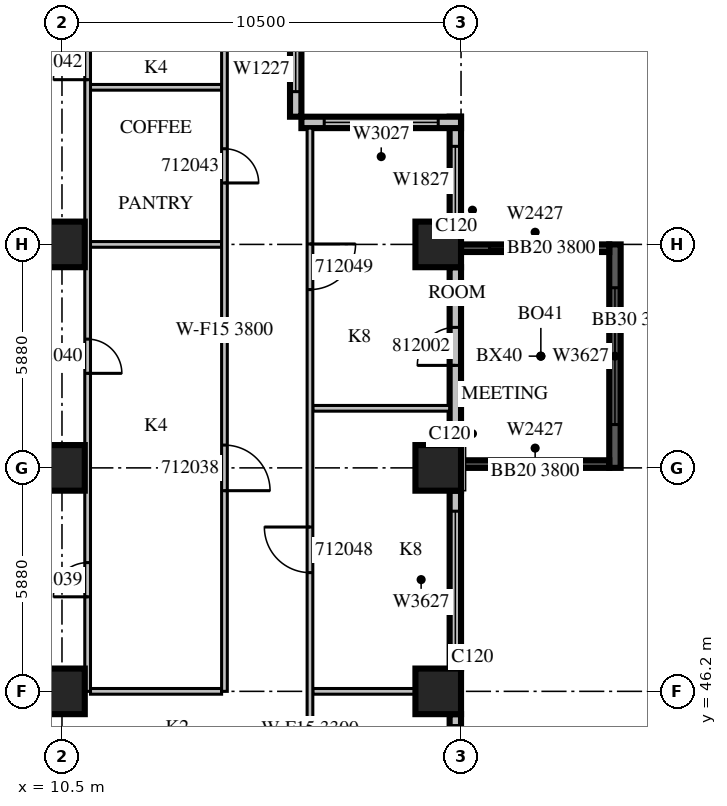
"""IFC4 building model, lengths in metres.
Left out: names, types, materials, properties, quantities, classifications, styles, units other than length and angle.
Written with IfcOpenShell. Run it as: python <this file> out.ifc"""

import sys

from ifc_helpers import new_model, si_unit, direction, frame, frame_2d, origin, origin_2d, place, context, subcontext, project, spatial, rectangle, extrude, source, transform, mapped, element, fill, save


model = new_model("IFC4")
c1 = context("Model", 3, precision=1e-05, world=origin(), true_north=direction((0.0, 1.0)))
c2 = subcontext(c1, "Body", "Model", "MODEL_VIEW")
j1 = project(units=[si_unit("LENGTHUNIT", "METRE"), si_unit("PLANEANGLEUNIT", "RADIAN")], contexts=[c1])
p1 = place(None, origin())
s1 = spatial("IfcSite", under=j1, at=p1, CompositionType="ELEMENT")
p2 = place(p1, origin())
s2 = spatial("IfcBuilding", under=s1, at=p2, CompositionType="ELEMENT")
p3 = place(p2, frame((0.0, 0.0, 61.5)))
s3 = spatial("IfcBuildingStorey", under=s2, at=p3, CompositionType="ELEMENT", Elevation=61.5)
m1 = source(origin(), c2, "Body", "SweptSolid", [
    extrude(rectangle(XDim=1.2, YDim=1.2, at=origin_2d()), origin(), (0.0, 0.0, 1.0), 4.2),
])
for number, where, z_axis, x_axis in (
    (1, (10.5, 46.2, 0.0), (0.0, 0.0, 1.0), (1.0, 0.0, 0.0)),
    (2, (20.4, 46.2, 0.0), (0.0, 0.0, 1.0), (1.0, 0.0, 0.0)),
    (3, (10.5, 52.08, 0.0), (0.0, 0.0, 1.0), (1.0, 0.0, 0.0)),
    (4, (20.4, 52.08, 0.0), (0.0, 0.0, 1.0), (1.0, 0.0, 0.0)),
    (5, (10.5, 57.96, 0.0), (0.0, 0.0, 1.0), (1.0, 0.0, 0.0)),
    (6, (20.4, 57.96, 0.0), (0.0, 0.0, 1.0), (1.0, 0.0, 0.0)),
):
    element("IfcColumn", number, at=place(p3, frame(where, z_axis=z_axis, x_axis=x_axis)), inside=s3, PredefinedType="COLUMN", context=c2, shape_type="MappedRepresentation", body=[
        mapped(m1, transform((0.0, 0.0, 0.0), scale=1.0)),
    ])
m2 = source(origin(), c2, "Body", "SweptSolid", [
    extrude(rectangle(XDim=5.88, YDim=0.3, at=frame_2d((2.94, 0.0))), origin(), (0.0, 0.0, 1.0), 3.8),
])
p4 = place(p3, frame((25.05, 52.08, 0.0), z_axis=(0.0, 0.0, 1.0), x_axis=(0.0, 1.0, 0.0)))
e7 = element("IfcWall", 7, at=p4, inside=s3, PredefinedType="SOLIDWALL", context=c2, shape_type="MappedRepresentation", body=[
    mapped(m2, transform((0.0, 0.0, 0.0), scale=1.0)),
])
m3 = source(origin(), c2, "Body", "SweptSolid", [
    extrude(rectangle(XDim=3.6, YDim=2.7, at=frame_2d((1.8, 1.35))), frame((0.0, 0.16, 0.0), z_axis=(0.0, -1.0, 0.0), x_axis=(1.0, 0.0, 0.0)), (0.0, 0.0, 1.0), 0.32),
])
p5 = place(p4, frame((1.14, 0.0, 0.6)))
e8 = element("IfcOpeningElement", 8, at=p5, cuts=e7, PredefinedType="OPENING", context=c2, shape_type="MappedRepresentation", body=[
    mapped(m3, transform((0.0, 0.0, 0.0), scale=1.0)),
])
m4 = source(origin(), c2, "Body", "SweptSolid", [
    extrude(rectangle(XDim=3.9, YDim=0.2, at=frame_2d((1.95, 0.0))), origin(), (0.0, 0.0, 1.0), 3.8),
])
p6 = place(p3, frame((21.0, 52.18, 0.0), z_axis=(0.0, 0.0, 1.0), x_axis=(1.0, 0.0, 0.0)))
e9 = element("IfcWall", 9, at=p6, inside=s3, PredefinedType="SOLIDWALL", context=c2, shape_type="MappedRepresentation", body=[
    mapped(m4, transform((0.0, 0.0, 0.0), scale=1.0)),
])
m5 = source(origin(), c2, "Body", "SweptSolid", [
    extrude(rectangle(XDim=2.4, YDim=2.7, at=frame_2d((1.2, 1.35))), frame((0.0, 0.11, 0.0), z_axis=(0.0, -1.0, 0.0), x_axis=(1.0, 0.0, 0.0)), (0.0, 0.0, 1.0), 0.22),
])
p7 = place(p6, frame((0.75, 0.0, 0.6)))
e10 = element("IfcOpeningElement", 10, at=p7, cuts=e9, PredefinedType="OPENING", context=c2, shape_type="MappedRepresentation", body=[
    mapped(m5, transform((0.0, 0.0, 0.0), scale=1.0)),
])
p8 = place(p3, frame((21.0, 57.86, 0.0), z_axis=(0.0, 0.0, 1.0), x_axis=(1.0, 0.0, 0.0)))
e11 = element("IfcWall", 11, at=p8, inside=s3, PredefinedType="SOLIDWALL", context=c2, shape_type="MappedRepresentation", body=[
    mapped(m4, transform((0.0, 0.0, 0.0), scale=1.0)),
])
p9 = place(p8, frame((0.75, 0.0, 0.6)))
e12 = element("IfcOpeningElement", 12, at=p9, cuts=e11, PredefinedType="OPENING", context=c2, shape_type="MappedRepresentation", body=[
    mapped(m5, transform((0.0, 0.0, 0.0), scale=1.0)),
])
m6 = source(origin(), c2, "Body", "SweptSolid", [
    extrude(rectangle(XDim=7.2, YDim=0.3, at=frame_2d((3.6, 0.0))), origin(), (0.0, 0.0, 1.0), 3.8),
])
p10 = place(p3, frame((20.85, 38.4, 0.0), z_axis=(0.0, 0.0, 1.0), x_axis=(0.0, 1.0, 0.0)))
e13 = element("IfcWall", 13, at=p10, inside=s3, PredefinedType="STANDARD", context=c2, shape_type="MappedRepresentation", body=[
    mapped(m6, transform((0.0, 0.0, 0.0), scale=1.0)),
])
m7 = source(origin(), c2, "Body", "SweptSolid", [
    extrude(rectangle(XDim=2.4, YDim=2.7, at=frame_2d((1.2, 1.35))), frame((0.0, 0.16, 0.0), z_axis=(0.0, -1.0, 0.0), x_axis=(1.0, 0.0, 0.0)), (0.0, 0.0, 1.0), 0.32),
])
p11 = place(p10, frame((0.3, 0.0, 0.6)))
e14 = element("IfcOpeningElement", 14, at=p11, cuts=e13, PredefinedType="OPENING", context=c2, shape_type="MappedRepresentation", body=[
    mapped(m7, transform((0.0, 0.0, 0.0), scale=1.0)),
])
p12 = place(p10, frame((4.5, 0.0, 0.6)))
e15 = element("IfcOpeningElement", 15, at=p12, cuts=e13, PredefinedType="OPENING", context=c2, shape_type="MappedRepresentation", body=[
    mapped(m7, transform((0.0, 0.0, 0.0), scale=1.0)),
])
m8 = source(origin(), c2, "Body", "SweptSolid", [
    extrude(rectangle(XDim=4.68, YDim=0.3, at=frame_2d((2.34, 0.0))), origin(), (0.0, 0.0, 1.0), 3.8),
])
p13 = place(p3, frame((20.85, 46.8, 0.0), z_axis=(0.0, 0.0, 1.0), x_axis=(0.0, 1.0, 0.0)))
e16 = element("IfcWall", 16, at=p13, inside=s3, PredefinedType="STANDARD", context=c2, shape_type="MappedRepresentation", body=[
    mapped(m8, transform((0.0, 0.0, 0.0), scale=1.0)),
])
p14 = place(p13, frame((0.54, 0.0, 0.6)))
e17 = element("IfcOpeningElement", 17, at=p14, cuts=e16, PredefinedType="OPENING", context=c2, shape_type="MappedRepresentation", body=[
    mapped(m3, transform((0.0, 0.0, 0.0), scale=1.0)),
])
p15 = place(p3, frame((20.85, 52.68, 0.0), z_axis=(0.0, 0.0, 1.0), x_axis=(0.0, 1.0, 0.0)))
e18 = element("IfcWall", 18, at=p15, inside=s3, PredefinedType="STANDARD", context=c2, shape_type="MappedRepresentation", body=[
    mapped(m8, transform((0.0, 0.0, 0.0), scale=1.0)),
])
m9 = source(origin(), c2, "Body", "SweptSolid", [
    extrude(rectangle(XDim=1.0, YDim=2.1, at=frame_2d((0.5, 1.05))), frame((0.0, 0.16, 0.0), z_axis=(0.0, -1.0, 0.0), x_axis=(1.0, 0.0, 0.0)), (0.0, 0.0, 1.0), 0.32),
])
p16 = place(p15, frame((2.097, 0.0, 0.0)))
e19 = element("IfcOpeningElement", 19, at=p16, cuts=e18, PredefinedType="OPENING", context=c2, shape_type="MappedRepresentation", body=[
    mapped(m9, transform((0.0, 0.0, 0.0), scale=1.0)),
])
m10 = source(origin(), c2, "Body", "SweptSolid", [
    extrude(rectangle(XDim=2.76, YDim=0.3, at=frame_2d((1.38, 0.0))), origin(), (0.0, 0.0, 1.0), 3.8),
])
p17 = place(p3, frame((20.85, 58.56, 0.0), z_axis=(0.0, 0.0, 1.0), x_axis=(0.0, 1.0, 0.0)))
e20 = element("IfcWall", 20, at=p17, inside=s3, PredefinedType="STANDARD", context=c2, shape_type="MappedRepresentation", body=[
    mapped(m10, transform((0.0, 0.0, 0.0), scale=1.0)),
])
m11 = source(origin(), c2, "Body", "SweptSolid", [
    extrude(rectangle(XDim=1.8, YDim=2.7, at=frame_2d((0.9, 1.35))), frame((0.0, 0.16, 0.0), z_axis=(0.0, -1.0, 0.0), x_axis=(1.0, 0.0, 0.0)), (0.0, 0.0, 1.0), 0.32),
])
p18 = place(p17, frame((0.18, 0.0, 0.6)))
e21 = element("IfcOpeningElement", 21, at=p18, cuts=e20, PredefinedType="OPENING", context=c2, shape_type="MappedRepresentation", body=[
    mapped(m11, transform((0.0, 0.0, 0.0), scale=1.0)),
])
m12 = source(origin(), c2, "Body", "SweptSolid", [
    extrude(rectangle(XDim=4.2, YDim=0.3, at=frame_2d((2.1, 0.0))), origin(), (0.0, 0.0, 1.0), 3.8),
])
p19 = place(p3, frame((21.0, 61.17, 0.0), z_axis=(0.0, 0.0, 1.0), x_axis=(-1.0, 0.0, 0.0)))
e22 = element("IfcWall", 22, at=p19, inside=s3, PredefinedType="STANDARD", context=c2, shape_type="MappedRepresentation", body=[
    mapped(m12, transform((0.0, 0.0, 0.0), scale=1.0)),
])
m13 = source(origin(), c2, "Body", "SweptSolid", [
    extrude(rectangle(XDim=3.0, YDim=2.7, at=frame_2d((1.5, 1.35))), frame((0.0, 0.16, 0.0), z_axis=(0.0, -1.0, 0.0), x_axis=(1.0, 0.0, 0.0)), (0.0, 0.0, 1.0), 0.32),
])
p20 = place(p19, frame((0.6, 0.0, 0.6)))
e23 = element("IfcOpeningElement", 23, at=p20, cuts=e22, PredefinedType="OPENING", context=c2, shape_type="MappedRepresentation", body=[
    mapped(m13, transform((0.0, 0.0, 0.0), scale=1.0)),
])
m14 = source(origin(), c2, "Body", "SweptSolid", [
    extrude(rectangle(XDim=2.52, YDim=0.3, at=frame_2d((1.26, 0.0))), origin(), (0.0, 0.0, 1.0), 3.8),
])
p21 = place(p3, frame((16.65, 61.32, 0.0), z_axis=(0.0, 0.0, 1.0), x_axis=(0.0, 1.0, 0.0)))
e24 = element("IfcWall", 24, at=p21, inside=s3, PredefinedType="STANDARD", context=c2, shape_type="MappedRepresentation", body=[
    mapped(m14, transform((0.0, 0.0, 0.0), scale=1.0)),
])
m15 = source(origin(), c2, "Body", "SweptSolid", [
    extrude(rectangle(XDim=1.2, YDim=2.7, at=frame_2d((0.6, 1.35))), frame((0.0, 0.16, 0.0), z_axis=(0.0, -1.0, 0.0), x_axis=(1.0, 0.0, 0.0)), (0.0, 0.0, 1.0), 0.32),
])
p22 = place(p21, frame((0.66, 0.0, 0.6)))
e25 = element("IfcOpeningElement", 25, at=p22, cuts=e24, PredefinedType="OPENING", context=c2, shape_type="MappedRepresentation", body=[
    mapped(m15, transform((0.0, 0.0, 0.0), scale=1.0)),
])
m16 = source(origin(), c2, "Body", "SweptSolid", [
    extrude(rectangle(XDim=3.45, YDim=0.15, at=frame_2d((1.725, 0.0))), origin(), (0.0, 0.0, 1.0), 3.8),
])
for number, where, z_axis, x_axis in (
    (26, (14.7, 62.093, 0.0), (0.0, 0.0, 1.0), (-1.0, 0.0, 0.0)),
    (27, (14.7, 46.2, 0.0), (0.0, 0.0, 1.0), (-1.0, 0.0, 0.0)),
    (28, (14.7, 57.96, 0.0), (0.0, 0.0, 1.0), (-1.0, 0.0, 0.0)),
):
    element("IfcWall", number, at=place(p3, frame(where, z_axis=z_axis, x_axis=x_axis)), inside=s3, PredefinedType="PARTITIONING", context=c2, shape_type="MappedRepresentation", body=[
        mapped(m16, transform((0.0, 0.0, 0.0), scale=1.0)),
    ])
m17 = source(origin(), c2, "Body", "SweptSolid", [
    extrude(rectangle(XDim=19.02, YDim=0.15, at=frame_2d((9.51, 0.0))), origin(), (0.0, 0.0, 1.0), 3.8),
])
p23 = place(p3, frame((11.175, 46.2, 0.0), z_axis=(0.0, 0.0, 1.0), x_axis=(0.0, 1.0, 0.0)))
e29 = element("IfcWall", 29, at=p23, inside=s3, PredefinedType="PARTITIONING", context=c2, shape_type="MappedRepresentation", body=[
    mapped(m17, transform((0.0, 0.0, 0.0), scale=1.0)),
])
m18 = source(origin(), c2, "Body", "SweptSolid", [
    extrude(rectangle(XDim=0.9, YDim=2.1, at=frame_2d((0.45, 1.05))), frame((0.0, 0.085, 0.0), z_axis=(0.0, -1.0, 0.0), x_axis=(1.0, 0.0, 0.0)), (0.0, 0.0, 1.0), 0.17),
])
p24 = place(p23, frame((2.487, 0.0, 0.0)))
e30 = element("IfcOpeningElement", 30, at=p24, cuts=e29, PredefinedType="OPENING", context=c2, shape_type="MappedRepresentation", body=[
    mapped(m18, transform((0.0, 0.0, 0.0), scale=1.0)),
])
p25 = place(p23, frame((8.367, 0.0, 0.0)))
e31 = element("IfcOpeningElement", 31, at=p25, cuts=e29, PredefinedType="OPENING", context=c2, shape_type="MappedRepresentation", body=[
    mapped(m18, transform((0.0, 0.0, 0.0), scale=1.0)),
])
p26 = place(p23, frame((16.094, 0.0, 0.0)))
e32 = element("IfcOpeningElement", 32, at=p26, cuts=e29, PredefinedType="OPENING", context=c2, shape_type="MappedRepresentation", body=[
    mapped(m18, transform((0.0, 0.0, 0.0), scale=1.0)),
])
m19 = source(origin(), c2, "Body", "SweptSolid", [
    extrude(rectangle(XDim=3.6, YDim=0.15, at=frame_2d((1.8, 0.0))), origin(), (0.0, 0.0, 1.0), 3.8),
])
p27 = place(p3, frame((17.1, 53.648, 0.0), z_axis=(0.0, 0.0, 1.0), x_axis=(1.0, 0.0, 0.0)))
e33 = element("IfcWall", 33, at=p27, inside=s3, PredefinedType="PARTITIONING", context=c2, shape_type="MappedRepresentation", body=[
    mapped(m19, transform((0.0, 0.0, 0.0), scale=1.0)),
])
m20 = source(origin(), c2, "Body", "SweptSolid", [
    extrude(rectangle(XDim=2.701, YDim=0.15, at=frame_2d((1.351, 0.0))), origin(), (0.0, 0.0, 1.0), 3.8),
])
p28 = place(p3, frame((19.801, 46.2, 0.0), z_axis=(0.0, 0.0, 1.0), x_axis=(-1.0, 0.0, 0.0)))
e34 = element("IfcWall", 34, at=p28, inside=s3, PredefinedType="PARTITIONING", context=c2, shape_type="MappedRepresentation", body=[
    mapped(m20, transform((0.0, 0.0, 0.0), scale=1.0)),
])
p29 = place(p3, frame((14.775, 46.2, 0.0), z_axis=(0.0, 0.0, 1.0), x_axis=(0.0, 1.0, 0.0)))
e35 = element("IfcWall", 35, at=p29, inside=s3, PredefinedType="PARTITIONING", context=c2, shape_type="MappedRepresentation", body=[
    mapped(m17, transform((0.0, 0.0, 0.0), scale=1.0)),
])
m21 = source(origin(), c2, "Body", "SweptSolid", [
    extrude(rectangle(XDim=1.2, YDim=2.1, at=frame_2d((0.6, 1.05))), frame((0.0, 0.085, 0.0), z_axis=(0.0, -1.0, 0.0), x_axis=(1.0, 0.0, 0.0)), (0.0, 0.0, 1.0), 0.17),
])
p30 = place(p29, frame((5.28, 0.0, 0.0)))
e36 = element("IfcOpeningElement", 36, at=p30, cuts=e35, PredefinedType="OPENING", context=c2, shape_type="MappedRepresentation", body=[
    mapped(m21, transform((0.0, 0.0, 0.0), scale=1.0)),
])
m22 = source(origin(), c2, "Body", "SweptSolid", [
    extrude(rectangle(XDim=1.1, YDim=2.1, at=frame_2d((0.55, 1.05))), frame((0.0, 0.085, 0.0), z_axis=(0.0, -1.0, 0.0), x_axis=(1.0, 0.0, 0.0)), (0.0, 0.0, 1.0), 0.17),
])
p31 = place(p29, frame((16.944, 0.0, 0.0)))
e37 = element("IfcOpeningElement", 37, at=p31, cuts=e35, PredefinedType="OPENING", context=c2, shape_type="MappedRepresentation", body=[
    mapped(m22, transform((0.0, 0.0, 0.0), scale=1.0)),
])
p32 = place(p29, frame((13.377, 0.0, 0.0)))
e38 = element("IfcOpeningElement", 38, at=p32, cuts=e35, PredefinedType="OPENING", context=c2, shape_type="MappedRepresentation", body=[
    mapped(m18, transform((0.0, 0.0, 0.0), scale=1.0)),
])
m23 = source(origin(), c2, "Body", "SweptSolid", [
    extrude(rectangle(XDim=31.62, YDim=0.15, at=frame_2d((15.81, 0.0))), origin(), (0.0, 0.0, 1.0), 3.3),
])
p33 = place(p3, frame((17.025, 61.02, 0.0), z_axis=(0.0, 0.0, 1.0), x_axis=(0.0, -1.0, 0.0)))
e39 = element("IfcWall", 39, at=p33, inside=s3, PredefinedType="PARTITIONING", context=c2, shape_type="MappedRepresentation", body=[
    mapped(m23, transform((0.0, 0.0, 0.0), scale=1.0)),
])
m24 = source(origin(), c2, "Body", "SweptSolid", [
    extrude(rectangle(XDim=1.0, YDim=2.1, at=frame_2d((0.5, 1.05))), frame((0.0, 0.085, 0.0), z_axis=(0.0, -1.0, 0.0), x_axis=(1.0, 0.0, 0.0)), (0.0, 0.0, 1.0), 0.17),
])
p34 = place(p33, frame((29.263, 0.0, 0.0)))
e40 = element("IfcOpeningElement", 40, at=p34, cuts=e39, PredefinedType="OPENING", context=c2, shape_type="MappedRepresentation", body=[
    mapped(m24, transform((0.0, 0.0, 0.0), scale=1.0)),
])
p35 = place(p33, frame((25.951, 0.0, 0.0)))
e41 = element("IfcOpeningElement", 41, at=p35, cuts=e39, PredefinedType="OPENING", context=c2, shape_type="MappedRepresentation", body=[
    mapped(m24, transform((0.0, 0.0, 0.0), scale=1.0)),
])
p36 = place(p33, frame((23.608, 0.0, 0.0)))
e42 = element("IfcOpeningElement", 42, at=p36, cuts=e39, PredefinedType="OPENING", context=c2, shape_type="MappedRepresentation", body=[
    mapped(m24, transform((0.0, 0.0, 0.0), scale=1.0)),
])
p37 = place(p33, frame((18.52, 0.0, 0.0)))
e43 = element("IfcOpeningElement", 43, at=p37, cuts=e39, PredefinedType="OPENING", context=c2, shape_type="MappedRepresentation", body=[
    mapped(m24, transform((0.0, 0.0, 0.0), scale=1.0)),
])
p38 = place(p33, frame((10.496, 0.0, 0.0)))
e44 = element("IfcOpeningElement", 44, at=p38, cuts=e39, PredefinedType="OPENING", context=c2, shape_type="MappedRepresentation", body=[
    mapped(m21, transform((0.0, 0.0, 0.0), scale=1.0)),
])
p39 = place(p33, frame((3.049, 0.0, 0.0)))
e45 = element("IfcOpeningElement", 45, at=p39, cuts=e39, PredefinedType="OPENING", context=c2, shape_type="MappedRepresentation", body=[
    mapped(m21, transform((0.0, 0.0, 0.0), scale=1.0)),
])
m25 = source(origin(), c2, "Body", "SweptSolid", [
    extrude(rectangle(XDim=3.6, YDim=2.7, at=frame_2d((1.8, 1.35))), frame((0.0, 0.03, 0.0), z_axis=(0.0, -1.0, 0.0), x_axis=(1.0, 0.0, 0.0)), (0.0, 0.0, 1.0), 0.06),
])
p40 = place(p5, origin())
e46 = element("IfcWindow", 46, at=p40, inside=s3, PartitioningType="SINGLE_PANEL", PredefinedType="WINDOW", context=c2, shape_type="MappedRepresentation", body=[
    mapped(m25, transform((0.0, 0.0, 0.0), scale=1.0)),
])
fill(e8, e46)
m26 = source(origin(), c2, "Body", "SweptSolid", [
    extrude(rectangle(XDim=2.4, YDim=2.7, at=frame_2d((1.2, 1.35))), frame((0.0, 0.03, 0.0), z_axis=(0.0, -1.0, 0.0), x_axis=(1.0, 0.0, 0.0)), (0.0, 0.0, 1.0), 0.06),
])
p41 = place(p7, origin())
e47 = element("IfcWindow", 47, at=p41, inside=s3, PartitioningType="SINGLE_PANEL", PredefinedType="WINDOW", context=c2, shape_type="MappedRepresentation", body=[
    mapped(m26, transform((0.0, 0.0, 0.0), scale=1.0)),
])
fill(e10, e47)
p42 = place(p9, origin())
e48 = element("IfcWindow", 48, at=p42, inside=s3, PartitioningType="SINGLE_PANEL", PredefinedType="WINDOW", context=c2, shape_type="MappedRepresentation", body=[
    mapped(m26, transform((0.0, 0.0, 0.0), scale=1.0)),
])
fill(e12, e48)
p43 = place(p12, origin())
e49 = element("IfcWindow", 49, at=p43, inside=s3, PartitioningType="SINGLE_PANEL", PredefinedType="WINDOW", context=c2, shape_type="MappedRepresentation", body=[
    mapped(m26, transform((0.0, 0.0, 0.0), scale=1.0)),
])
fill(e15, e49)
p44 = place(p14, origin())
e50 = element("IfcWindow", 50, at=p44, inside=s3, PartitioningType="SINGLE_PANEL", PredefinedType="WINDOW", context=c2, shape_type="MappedRepresentation", body=[
    mapped(m25, transform((0.0, 0.0, 0.0), scale=1.0)),
])
fill(e17, e50)
m27 = source(origin(), c2, "Body", "SweptSolid", [
    extrude(rectangle(XDim=1.8, YDim=2.7, at=frame_2d((0.9, 1.35))), frame((0.0, 0.03, 0.0), z_axis=(0.0, -1.0, 0.0), x_axis=(1.0, 0.0, 0.0)), (0.0, 0.0, 1.0), 0.06),
])
p45 = place(p18, origin())
e51 = element("IfcWindow", 51, at=p45, inside=s3, PartitioningType="SINGLE_PANEL", PredefinedType="WINDOW", context=c2, shape_type="MappedRepresentation", body=[
    mapped(m27, transform((0.0, 0.0, 0.0), scale=1.0)),
])
fill(e21, e51)
m28 = source(origin(), c2, "Body", "SweptSolid", [
    extrude(rectangle(XDim=3.0, YDim=2.7, at=frame_2d((1.5, 1.35))), frame((0.0, 0.03, 0.0), z_axis=(0.0, -1.0, 0.0), x_axis=(1.0, 0.0, 0.0)), (0.0, 0.0, 1.0), 0.06),
])
p46 = place(p20, origin())
e52 = element("IfcWindow", 52, at=p46, inside=s3, PartitioningType="SINGLE_PANEL", PredefinedType="WINDOW", context=c2, shape_type="MappedRepresentation", body=[
    mapped(m28, transform((0.0, 0.0, 0.0), scale=1.0)),
])
fill(e23, e52)
m29 = source(origin(), c2, "Body", "SweptSolid", [
    extrude(rectangle(XDim=1.2, YDim=2.7, at=frame_2d((0.6, 1.35))), frame((0.0, 0.03, 0.0), z_axis=(0.0, -1.0, 0.0), x_axis=(1.0, 0.0, 0.0)), (0.0, 0.0, 1.0), 0.06),
])
p47 = place(p22, origin())
e53 = element("IfcWindow", 53, at=p47, inside=s3, PartitioningType="SINGLE_PANEL", PredefinedType="WINDOW", context=c2, shape_type="MappedRepresentation", body=[
    mapped(m29, transform((0.0, 0.0, 0.0), scale=1.0)),
])
fill(e25, e53)
m30 = source(origin(), c2, "Body", "SweptSolid", [
    extrude(rectangle(XDim=1.2, YDim=2.1, at=frame_2d((0.6, 1.05))), frame((0.0, 0.025, 0.0), z_axis=(0.0, -1.0, 0.0), x_axis=(1.0, 0.0, 0.0)), (0.0, 0.0, 1.0), 0.05),
])
p48 = place(p30, origin())
e54 = element("IfcDoor", 54, at=p48, inside=s3, OperationType="SINGLE_SWING_RIGHT", PredefinedType="DOOR", context=c2, shape_type="MappedRepresentation", body=[
    mapped(m30, transform((0.0, 0.0, 0.0), scale=1.0)),
])
fill(e36, e54)
m31 = source(origin(), c2, "Body", "SweptSolid", [
    extrude(rectangle(XDim=0.9, YDim=2.1, at=frame_2d((0.45, 1.05))), frame((0.0, 0.025, 0.0), z_axis=(0.0, -1.0, 0.0), x_axis=(1.0, 0.0, 0.0)), (0.0, 0.0, 1.0), 0.05),
])
p49 = place(p24, origin())
e55 = element("IfcDoor", 55, at=p49, inside=s3, OperationType="SINGLE_SWING_LEFT", PredefinedType="DOOR", context=c2, shape_type="MappedRepresentation", body=[
    mapped(m31, transform((0.0, 0.0, 0.0), scale=1.0)),
])
fill(e30, e55)
p50 = place(p25, origin())
e56 = element("IfcDoor", 56, at=p50, inside=s3, OperationType="SINGLE_SWING_RIGHT", PredefinedType="DOOR", context=c2, shape_type="MappedRepresentation", body=[
    mapped(m31, transform((0.0, 0.0, 0.0), scale=1.0)),
])
fill(e31, e56)
p51 = place(p26, origin())
e57 = element("IfcDoor", 57, at=p51, inside=s3, OperationType="SINGLE_SWING_LEFT", PredefinedType="DOOR", context=c2, shape_type="MappedRepresentation", body=[
    mapped(m31, transform((0.0, 0.0, 0.0), scale=1.0)),
])
fill(e32, e57)
p52 = place(p32, origin())
e58 = element("IfcDoor", 58, at=p52, inside=s3, OperationType="SINGLE_SWING_RIGHT", PredefinedType="DOOR", context=c2, shape_type="MappedRepresentation", body=[
    mapped(m31, transform((0.0, 0.0, 0.0), scale=1.0)),
])
fill(e38, e58)
p53 = place(p38, origin())
e59 = element("IfcDoor", 59, at=p53, inside=s3, OperationType="SINGLE_SWING_RIGHT", PredefinedType="DOOR", context=c2, shape_type="MappedRepresentation", body=[
    mapped(m30, transform((0.0, 0.0, 0.0), scale=1.0)),
])
fill(e44, e59)
p54 = place(p39, origin())
e60 = element("IfcDoor", 60, at=p54, inside=s3, OperationType="SINGLE_SWING_LEFT", PredefinedType="DOOR", context=c2, shape_type="MappedRepresentation", body=[
    mapped(m30, transform((0.0, 0.0, 0.0), scale=1.0)),
])
fill(e45, e60)
m32 = source(origin(), c2, "Body", "SweptSolid", [
    extrude(rectangle(XDim=1.0, YDim=2.1, at=frame_2d((0.5, 1.05))), frame((0.0, 0.025, 0.0), z_axis=(0.0, -1.0, 0.0), x_axis=(1.0, 0.0, 0.0)), (0.0, 0.0, 1.0), 0.05),
])
p55 = place(p16, origin())
e61 = element("IfcDoor", 61, at=p55, inside=s3, OperationType="SINGLE_SWING_LEFT", PredefinedType="DOOR", context=c2, shape_type="MappedRepresentation", body=[
    mapped(m32, transform((0.0, 0.0, 0.0), scale=1.0)),
])
fill(e19, e61)
save(model, sys.argv[1])
